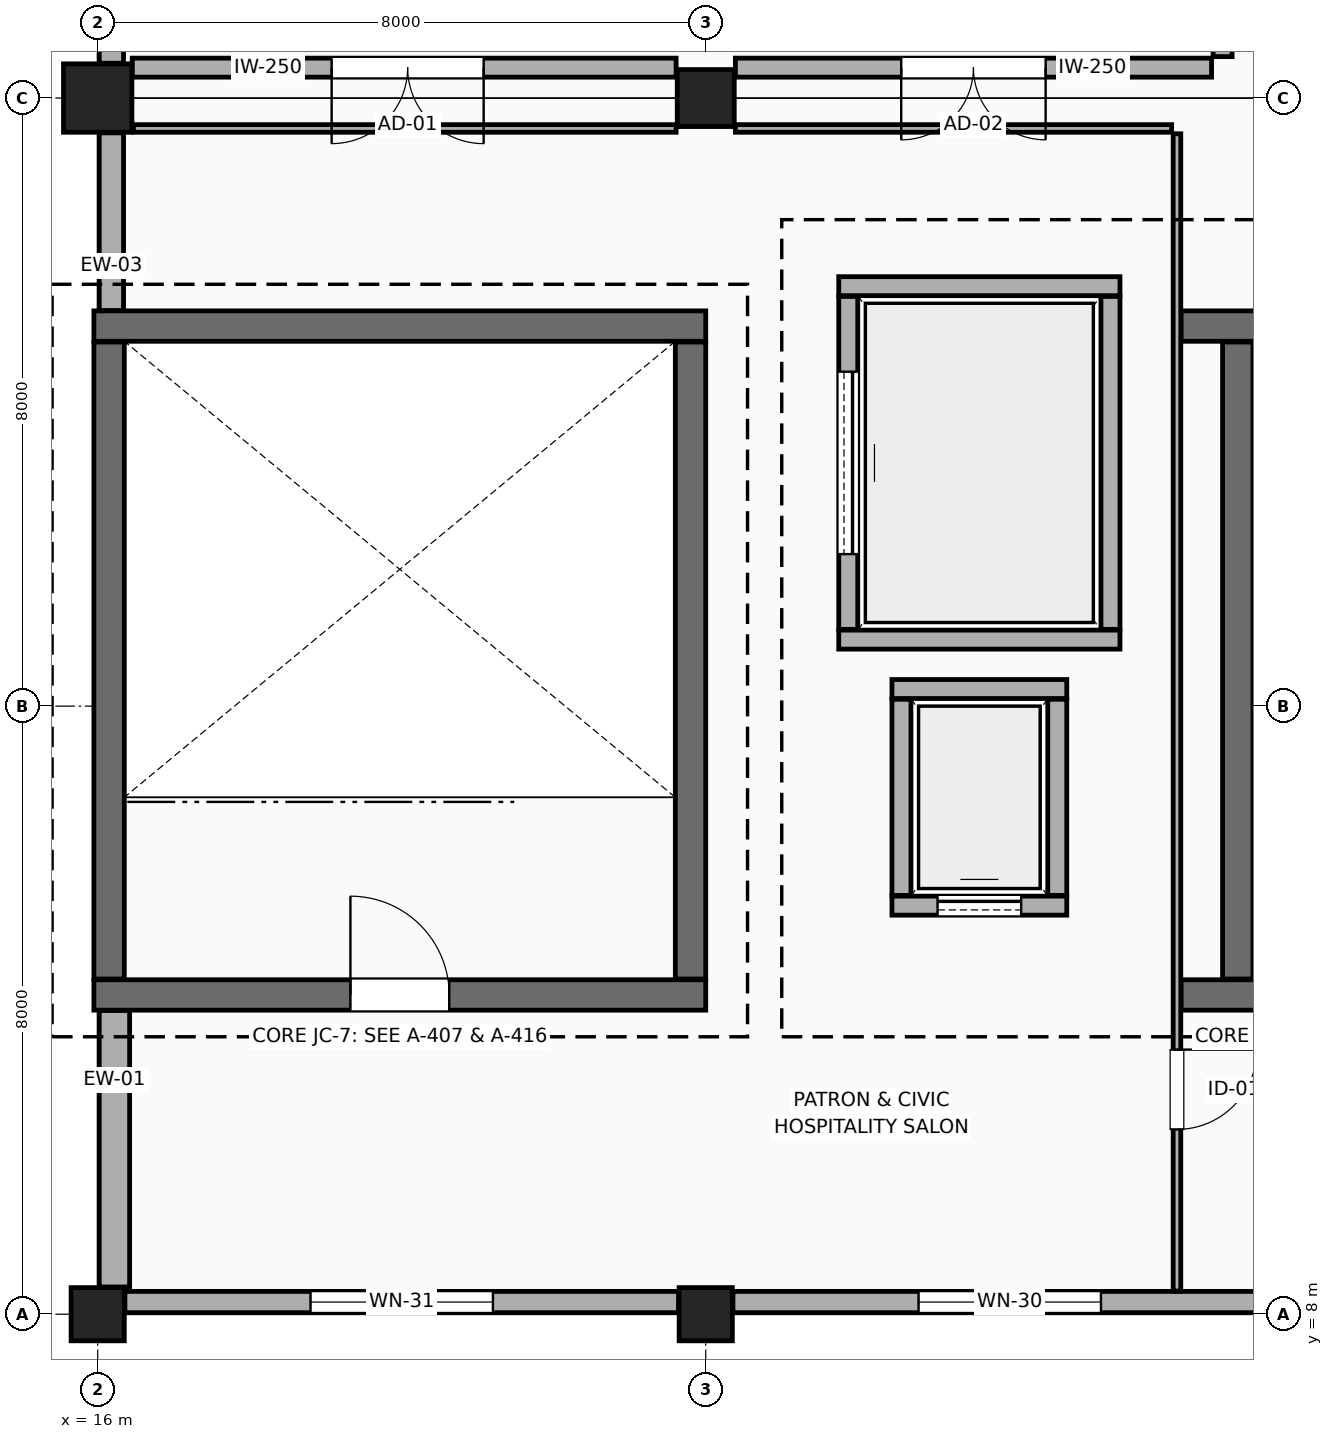
"""IFC4 building model, lengths in metres.
Left out: names, types, materials, properties, quantities, classifications, styles, units other than length and angle.
Written with IfcOpenShell. Run it as: python <this file> out.ifc"""

import sys

from ifc_helpers import new_model, si_unit, direction, frame, frame_2d, origin, origin_2d, place, context, subcontext, project, spatial, rectangle, circle, extrude, element, fill, save


model = new_model("IFC4")
c1 = context("Model", 3, precision=1e-05, world=origin(), true_north=direction((0.0, 1.0)))
c2 = subcontext(c1, "Body", "Model", "MODEL_VIEW")
j1 = project(units=[si_unit("LENGTHUNIT", "METRE"), si_unit("PLANEANGLEUNIT", "RADIAN")], contexts=[c1])
p1 = place(None, origin())
s1 = spatial("IfcSite", under=j1, at=p1, CompositionType="ELEMENT")
p2 = place(p1, origin())
s2 = spatial("IfcBuilding", under=s1, at=p2, CompositionType="ELEMENT")
p3 = place(p2, frame((0.0, 0.0, 10.2)))
s3 = spatial("IfcBuildingStorey", under=s2, at=p3, CompositionType="ELEMENT", Elevation=10.2)
p4 = place(p3, frame((16.0, 8.0, 0.0), z_axis=(0.0, 0.0, 1.0), x_axis=(1.0, 0.0, 0.0)))
e1 = element("IfcColumn", 1, at=p4, inside=s3, PredefinedType="COLUMN", context=c2, shape_type="SweptSolid", body=[
    extrude(circle(Radius=0.35, at=origin_2d()), origin(), (0.0, 0.0, 1.0), 4.76),
])
p5 = place(p3, frame((16.0, 24.0, 0.0), z_axis=(0.0, 0.0, 1.0), x_axis=(1.0, 0.0, 0.0)))
e2 = element("IfcColumn", 2, at=p5, inside=s3, PredefinedType="COLUMN", context=c2, shape_type="SweptSolid", body=[
    extrude(rectangle(XDim=0.9, YDim=0.9, at=origin_2d()), origin(), (0.0, 0.0, 1.0), 4.8),
])
p6 = place(p3, frame((24.0, 8.0, 0.0), z_axis=(0.0, 0.0, 1.0), x_axis=(1.0, 0.0, 0.0)))
e3 = element("IfcColumn", 3, at=p6, inside=s3, PredefinedType="COLUMN", context=c2, shape_type="SweptSolid", body=[
    extrude(circle(Radius=0.35, at=origin_2d()), origin(), (0.0, 0.0, 1.0), 4.76),
])
p7 = place(p3, frame((24.0, 24.0, 0.0), z_axis=(0.0, 0.0, 1.0), x_axis=(1.0, 0.0, 0.0)))
e4 = element("IfcColumn", 4, at=p7, inside=s3, PredefinedType="COLUMN", context=c2, shape_type="SweptSolid", body=[
    extrude(rectangle(XDim=0.75, YDim=0.75, at=origin_2d()), origin(), (0.0, 0.0, 1.0), 4.8),
])
p8 = place(p3, frame((31.642, 8.16, 0.0), z_axis=(0.0, 0.0, 1.0), x_axis=(-1.0, 0.0, 0.0)))
e5 = element("IfcWall", 5, at=p8, inside=s3, PredefinedType="STANDARD", context=c2, shape_type="SweptSolid", body=[
    extrude(rectangle(XDim=7.284, YDim=0.28, at=frame_2d((3.642, 0.0))), origin(), (0.0, 0.0, 1.0), 4.075),
])
p9 = place(p8, frame((2.442, 0.0, 0.95)))
e6 = element("IfcOpeningElement", 6, at=p9, cuts=e5, PredefinedType="OPENING", context=c2, shape_type="SweptSolid", body=[
    extrude(rectangle(XDim=2.4, YDim=1.5, at=frame_2d((1.2, 0.75))), frame((0.0, 0.15, 0.0), z_axis=(0.0, -1.0, 0.0), x_axis=(1.0, 0.0, 0.0)), (0.0, 0.0, 1.0), 0.3),
])
p10 = place(p3, frame((23.642, 8.16, 0.0), z_axis=(0.0, 0.0, 1.0), x_axis=(-1.0, 0.0, 0.0)))
e7 = element("IfcWall", 7, at=p10, inside=s3, PredefinedType="STANDARD", context=c2, shape_type="SweptSolid", body=[
    extrude(rectangle(XDim=7.284, YDim=0.28, at=frame_2d((3.642, 0.0))), origin(), (0.0, 0.0, 1.0), 4.025),
])
p11 = place(p10, frame((2.442, 0.0, 0.95)))
e8 = element("IfcOpeningElement", 8, at=p11, cuts=e7, PredefinedType="OPENING", context=c2, shape_type="SweptSolid", body=[
    extrude(rectangle(XDim=2.4, YDim=1.8, at=frame_2d((1.2, 0.9))), frame((0.0, 0.15, 0.0), z_axis=(0.0, -1.0, 0.0), x_axis=(1.0, 0.0, 0.0)), (0.0, 0.0, 1.0), 0.3),
])
p12 = place(p3, frame((16.22, 8.358, 0.0), z_axis=(0.0, 0.0, 1.0), x_axis=(0.0, 1.0, 0.0)))
e9 = element("IfcWall", 9, at=p12, inside=s3, PredefinedType="STANDARD", context=c2, shape_type="SweptSolid", body=[
    extrude(rectangle(XDim=3.638, YDim=0.4, at=frame_2d((1.819, 0.0))), origin(), (0.0, 0.0, 1.0), 4.225),
])
p13 = place(p3, frame((16.18, 21.204, 0.0), z_axis=(0.0, 0.0, 1.0), x_axis=(0.0, 1.0, 0.0)))
e10 = element("IfcWall", 10, at=p13, inside=s3, PredefinedType="STANDARD", context=c2, shape_type="SweptSolid", body=[
    extrude(rectangle(XDim=2.338, YDim=0.32, at=frame_2d((1.169, 0.0))), origin(), (0.0, 0.0, 1.0), 4.225),
])
p14 = place(p3, frame((16.18, 24.458, 0.0), z_axis=(0.0, 0.0, 1.0), x_axis=(0.0, 1.0, 0.0)))
e11 = element("IfcWall", 11, at=p14, inside=s3, PredefinedType="STANDARD", context=c2, shape_type="SweptSolid", body=[
    extrude(rectangle(XDim=7.084, YDim=0.32, at=frame_2d((3.542, 0.0))), origin(), (0.0, 0.0, 1.0), 3.925),
])
p15 = place(p14, frame((2.342, 0.0, 0.95)))
e12 = element("IfcOpeningElement", 12, at=p15, cuts=e11, PredefinedType="OPENING", context=c2, shape_type="SweptSolid", body=[
    extrude(rectangle(XDim=2.4, YDim=2.1, at=frame_2d((1.2, 1.05))), frame((0.0, 0.17, 0.0), z_axis=(0.0, -1.0, 0.0), x_axis=(1.0, 0.0, 0.0)), (0.0, 0.0, 1.0), 0.34),
])
p16 = place(p3, frame((30.254, 12.2, 0.0), z_axis=(0.0, 0.0, 1.0), x_axis=(1.0, 0.0, 0.0)))
e13 = element("IfcWall", 13, at=p16, inside=s3, PredefinedType="SHEAR", context=c2, shape_type="SweptSolid", body=[
    extrude(rectangle(XDim=8.946, YDim=0.4, at=frame_2d((4.473, 0.0))), origin(), (0.0, 0.0, 1.0), 4.54),
])
p17 = place(p16, frame((4.096, 0.0, 0.0)))
e14 = element("IfcOpeningElement", 14, at=p17, cuts=e13, PredefinedType="OPENING", context=c2, shape_type="SweptSolid", body=[
    extrude(rectangle(XDim=1.3, YDim=2.15, at=frame_2d((0.65, 1.075))), frame((0.0, 0.21, 0.0), z_axis=(0.0, -1.0, 0.0), x_axis=(1.0, 0.0, 0.0)), (0.0, 0.0, 1.0), 0.42),
])
p18 = place(p3, frame((39.2, 21.0, 0.0), z_axis=(0.0, 0.0, 1.0), x_axis=(-1.0, 0.0, 0.0)))
e15 = element("IfcWall", 15, at=p18, inside=s3, PredefinedType="SHEAR", context=c2, shape_type="SweptSolid", body=[
    extrude(rectangle(XDim=8.946, YDim=0.4, at=frame_2d((4.473, 0.0))), origin(), (0.0, 0.0, 1.0), 4.54),
])
p19 = place(p3, frame((31.0, 20.79, 0.0), z_axis=(0.0, 0.0, 1.0), x_axis=(0.0, -1.0, 0.0)))
e16 = element("IfcWall", 16, at=p19, inside=s3, PredefinedType="SHEAR", context=c2, shape_type="SweptSolid", body=[
    extrude(rectangle(XDim=8.38, YDim=0.4, at=frame_2d((4.19, 0.0))), origin(), (0.0, 0.0, 1.0), 4.54),
])
p20 = place(p3, frame((26.45, 13.375, 0.0), z_axis=(0.0, 0.0, 1.0), x_axis=(1.0, 0.0, 0.0)))
e17 = element("IfcWall", 17, at=p20, inside=s3, PredefinedType="STANDARD", context=c2, shape_type="SweptSolid", body=[
    extrude(rectangle(XDim=2.3, YDim=0.25, at=frame_2d((1.15, 0.0))), origin(), (0.0, 0.0, 1.0), 4.53),
])
p21 = place(p20, frame((0.6, 0.0, 0.0)))
e18 = element("IfcOpeningElement", 18, at=p21, cuts=e17, PredefinedType="OPENING", context=c2, shape_type="SweptSolid", body=[
    extrude(rectangle(XDim=1.1, YDim=2.15, at=frame_2d((0.55, 1.075))), frame((0.0, 0.135, 0.0), z_axis=(0.0, -1.0, 0.0), x_axis=(1.0, 0.0, 0.0)), (0.0, 0.0, 1.0), 0.27),
])
p22 = place(p3, frame((28.75, 16.225, 0.0), z_axis=(0.0, 0.0, 1.0), x_axis=(-1.0, 0.0, 0.0)))
e19 = element("IfcWall", 19, at=p22, inside=s3, PredefinedType="STANDARD", context=c2, shape_type="SweptSolid", body=[
    extrude(rectangle(XDim=2.3, YDim=0.25, at=frame_2d((1.15, 0.0))), origin(), (0.0, 0.0, 1.0), 4.53),
])
for number, where, z_axis, x_axis in (
    (20, (28.625, 13.51, 0.0), (0.0, 0.0, 1.0), (0.0, 1.0, 0.0)),
    (21, (26.575, 16.09, 0.0), (0.0, 0.0, 1.0), (0.0, -1.0, 0.0)),
):
    element("IfcWall", number, at=place(p3, frame(where, z_axis=z_axis, x_axis=x_axis)), inside=s3, PredefinedType="STANDARD", context=c2, shape_type="SweptSolid", body=[
        extrude(rectangle(XDim=2.58, YDim=0.25, at=frame_2d((1.29, 0.0))), origin(), (0.0, 0.0, 1.0), 4.53),
    ])
for number, where, z_axis, x_axis in (
    (22, (25.75, 16.875, 0.0), (0.0, 0.0, 1.0), (1.0, 0.0, 0.0)),
    (23, (29.45, 21.525, 0.0), (0.0, 0.0, 1.0), (-1.0, 0.0, 0.0)),
):
    element("IfcWall", number, at=place(p3, frame(where, z_axis=z_axis, x_axis=x_axis)), inside=s3, PredefinedType="STANDARD", context=c2, shape_type="SweptSolid", body=[
        extrude(rectangle(XDim=3.7, YDim=0.25, at=frame_2d((1.85, 0.0))), origin(), (0.0, 0.0, 1.0), 4.53),
    ])
p23 = place(p3, frame((29.325, 17.01, 0.0), z_axis=(0.0, 0.0, 1.0), x_axis=(0.0, 1.0, 0.0)))
e24 = element("IfcWall", 24, at=p23, inside=s3, PredefinedType="STANDARD", context=c2, shape_type="SweptSolid", body=[
    extrude(rectangle(XDim=4.38, YDim=0.25, at=frame_2d((2.19, 0.0))), origin(), (0.0, 0.0, 1.0), 4.53),
])
p24 = place(p3, frame((25.875, 21.39, 0.0), z_axis=(0.0, 0.0, 1.0), x_axis=(0.0, -1.0, 0.0)))
e25 = element("IfcWall", 25, at=p24, inside=s3, PredefinedType="STANDARD", context=c2, shape_type="SweptSolid", body=[
    extrude(rectangle(XDim=4.38, YDim=0.25, at=frame_2d((2.19, 0.0))), origin(), (0.0, 0.0, 1.0), 4.53),
])
p25 = place(p24, frame((0.99, 0.0, 0.0)))
e26 = element("IfcOpeningElement", 26, at=p25, cuts=e25, PredefinedType="OPENING", context=c2, shape_type="SweptSolid", body=[
    extrude(rectangle(XDim=2.4, YDim=2.55, at=frame_2d((1.2, 1.275))), frame((0.0, 0.135, 0.0), z_axis=(0.0, -1.0, 0.0), x_axis=(1.0, 0.0, 0.0)), (0.0, 0.0, 1.0), 0.27),
])
p26 = place(p3, frame((15.95, 12.2, 0.0), z_axis=(0.0, 0.0, 1.0), x_axis=(1.0, 0.0, 0.0)))
e27 = element("IfcWall", 27, at=p26, inside=s3, PredefinedType="SHEAR", context=c2, shape_type="SweptSolid", body=[
    extrude(rectangle(XDim=8.05, YDim=0.4, at=frame_2d((4.025, 0.0))), origin(), (0.0, 0.0, 1.0), 4.58),
])
p27 = place(p26, frame((3.375, 0.0, 0.0)))
e28 = element("IfcOpeningElement", 28, at=p27, cuts=e27, PredefinedType="OPENING", context=c2, shape_type="SweptSolid", body=[
    extrude(rectangle(XDim=1.3, YDim=2.15, at=frame_2d((0.65, 1.075))), frame((0.0, 0.21, 0.0), z_axis=(0.0, -1.0, 0.0), x_axis=(1.0, 0.0, 0.0)), (0.0, 0.0, 1.0), 0.42),
])
p28 = place(p3, frame((24.0, 21.0, 0.0), z_axis=(0.0, 0.0, 1.0), x_axis=(-1.0, 0.0, 0.0)))
e29 = element("IfcWall", 29, at=p28, inside=s3, PredefinedType="SHEAR", context=c2, shape_type="SweptSolid", body=[
    extrude(rectangle(XDim=8.05, YDim=0.4, at=frame_2d((4.025, 0.0))), origin(), (0.0, 0.0, 1.0), 4.58),
])
for number, where, z_axis, x_axis in (
    (30, (23.8, 12.41, 0.0), (0.0, 0.0, 1.0), (0.0, 1.0, 0.0)),
    (31, (16.15, 20.79, 0.0), (0.0, 0.0, 1.0), (0.0, -1.0, 0.0)),
):
    element("IfcWall", number, at=place(p3, frame(where, z_axis=z_axis, x_axis=x_axis)), inside=s3, PredefinedType="SHEAR", context=c2, shape_type="SweptSolid", body=[
        extrude(rectangle(XDim=8.38, YDim=0.4, at=frame_2d((4.19, 0.0))), origin(), (0.0, 0.0, 1.0), 4.58),
    ])
p29 = place(p3, frame((30.8, 49.455, 0.0), z_axis=(0.0, 0.0, 1.0), x_axis=(0.0, -1.0, 0.0)))
e32 = element("IfcWall", 32, at=p29, inside=s3, PredefinedType="PARTITIONING", context=c2, shape_type="SweptSolid", body=[
    extrude(rectangle(XDim=24.91, YDim=0.25, at=frame_2d((12.455, 0.0))), origin(), (0.0, 0.0, 1.0), 4.53),
])
p30 = place(p3, frame((30.655, 24.4, 0.0), z_axis=(0.0, 0.0, 1.0), x_axis=(-1.0, 0.0, 0.0)))
e33 = element("IfcWall", 33, at=p30, inside=s3, PredefinedType="PARTITIONING", context=c2, shape_type="SweptSolid", body=[
    extrude(rectangle(XDim=6.265, YDim=0.25, at=frame_2d((3.133, 0.0))), origin(), (0.0, 0.0, 1.0), 4.53),
])
p31 = place(p30, frame((2.183, 0.0, 0.0)))
e34 = element("IfcOpeningElement", 34, at=p31, cuts=e33, PredefinedType="OPENING", context=c2, shape_type="SweptSolid", body=[
    extrude(rectangle(XDim=1.9, YDim=2.35, at=frame_2d((0.95, 1.175))), frame((0.0, 0.135, 0.0), z_axis=(0.0, -1.0, 0.0), x_axis=(1.0, 0.0, 0.0)), (0.0, 0.0, 1.0), 0.27),
])
p32 = place(p3, frame((23.61, 24.4, 0.0), z_axis=(0.0, 0.0, 1.0), x_axis=(-1.0, 0.0, 0.0)))
e35 = element("IfcWall", 35, at=p32, inside=s3, PredefinedType="PARTITIONING", context=c2, shape_type="SweptSolid", body=[
    extrude(rectangle(XDim=7.156, YDim=0.25, at=frame_2d((3.578, 0.0))), origin(), (0.0, 0.0, 1.0), 4.53),
])
p33 = place(p32, frame((2.532, 0.0, 0.0)))
e36 = element("IfcOpeningElement", 36, at=p33, cuts=e35, PredefinedType="OPENING", context=c2, shape_type="SweptSolid", body=[
    extrude(rectangle(XDim=2.0, YDim=2.35, at=frame_2d((1.0, 1.175))), frame((0.0, 0.135, 0.0), z_axis=(0.0, -1.0, 0.0), x_axis=(1.0, 0.0, 0.0)), (0.0, 0.0, 1.0), 0.27),
])
p34 = place(p3, frame((30.2, 23.53, 0.0), z_axis=(0.0, 0.0, 1.0), x_axis=(0.0, -1.0, 0.0)))
e37 = element("IfcWall", 37, at=p34, inside=s3, PredefinedType="PARTITIONING", context=c2, shape_type="SweptSolid", body=[
    extrude(rectangle(XDim=15.226, YDim=0.1, at=frame_2d((7.613, 0.0))), origin(), (0.0, 0.0, 1.0), 4.53),
])
p35 = place(p34, frame((12.049, 0.0, 0.0)))
e38 = element("IfcOpeningElement", 38, at=p35, cuts=e37, PredefinedType="OPENING", context=c2, shape_type="SweptSolid", body=[
    extrude(rectangle(XDim=1.05, YDim=2.15, at=frame_2d((0.525, 1.075))), frame((0.0, 0.06, 0.0), z_axis=(0.0, -1.0, 0.0), x_axis=(1.0, 0.0, 0.0)), (0.0, 0.0, 1.0), 0.12),
])
p36 = place(p3, frame((16.47, 23.6, 0.0), z_axis=(0.0, 0.0, 1.0), x_axis=(1.0, 0.0, 0.0)))
e39 = element("IfcWall", 39, at=p36, inside=s3, PredefinedType="PARTITIONING", context=c2, shape_type="SweptSolid", body=[
    extrude(rectangle(XDim=7.14, YDim=0.1, at=frame_2d((3.57, 0.0))), origin(), (0.0, 0.0, 1.0), 4.57),
])
p37 = place(p3, frame((24.39, 23.6, 0.0), z_axis=(0.0, 0.0, 1.0), x_axis=(1.0, 0.0, 0.0)))
e40 = element("IfcWall", 40, at=p37, inside=s3, PredefinedType="PARTITIONING", context=c2, shape_type="SweptSolid", body=[
    extrude(rectangle(XDim=5.74, YDim=0.1, at=frame_2d((2.87, 0.0))), origin(), (0.0, 0.0, 1.0), 4.53),
])
p38 = place(p9, origin())
e41 = element("IfcWindow", 41, at=p38, inside=s3, PartitioningType="SINGLE_PANEL", PredefinedType="SKYLIGHT", context=c2, shape_type="SweptSolid", body=[
    extrude(rectangle(XDim=2.4, YDim=1.5, at=frame_2d((1.2, 0.75))), frame((0.0, 0.03, 0.0), z_axis=(0.0, -1.0, 0.0), x_axis=(1.0, 0.0, 0.0)), (0.0, 0.0, 1.0), 0.06),
])
fill(e6, e41)
p39 = place(p11, origin())
e42 = element("IfcWindow", 42, at=p39, inside=s3, PartitioningType="SINGLE_PANEL", PredefinedType="SKYLIGHT", context=c2, shape_type="SweptSolid", body=[
    extrude(rectangle(XDim=2.4, YDim=1.8, at=frame_2d((1.2, 0.9))), frame((0.0, 0.03, 0.0), z_axis=(0.0, -1.0, 0.0), x_axis=(1.0, 0.0, 0.0)), (0.0, 0.0, 1.0), 0.06),
])
fill(e8, e42)
p40 = place(p21, origin())
e43 = element("IfcDoor", 43, at=p40, inside=s3, OperationType="DOUBLE_DOOR_SLIDING", PredefinedType="DOOR", context=c2, shape_type="SweptSolid", body=[
    extrude(rectangle(XDim=1.1, YDim=2.15, at=frame_2d((0.55, 1.075))), frame((0.0, 0.025, 0.0), z_axis=(0.0, -1.0, 0.0), x_axis=(1.0, 0.0, 0.0)), (0.0, 0.0, 1.0), 0.05),
])
fill(e18, e43)
p41 = place(p25, origin())
e44 = element("IfcDoor", 44, at=p41, inside=s3, OperationType="DOUBLE_DOOR_SLIDING", PredefinedType="DOOR", context=c2, shape_type="SweptSolid", body=[
    extrude(rectangle(XDim=2.4, YDim=2.55, at=frame_2d((1.2, 1.275))), frame((0.0, 0.025, 0.0), z_axis=(0.0, -1.0, 0.0), x_axis=(1.0, 0.0, 0.0)), (0.0, 0.0, 1.0), 0.05),
])
fill(e26, e44)
p42 = place(p27, origin())
e45 = element("IfcDoor", 45, at=p42, inside=s3, OperationType="SINGLE_SWING_LEFT", PredefinedType="DOOR", context=c2, shape_type="SweptSolid", body=[
    extrude(rectangle(XDim=1.3, YDim=2.15, at=frame_2d((0.65, 1.075))), frame((0.0, 0.025, 0.0), z_axis=(0.0, -1.0, 0.0), x_axis=(1.0, 0.0, 0.0)), (0.0, 0.0, 1.0), 0.05),
])
fill(e28, e45)
p43 = place(p33, origin())
e46 = element("IfcDoor", 46, at=p43, inside=s3, OperationType="DOUBLE_SWING_LEFT", PredefinedType="DOOR", context=c2, shape_type="SweptSolid", body=[
    extrude(rectangle(XDim=2.0, YDim=2.35, at=frame_2d((1.0, 1.175))), frame((0.0, 0.025, 0.0), z_axis=(0.0, -1.0, 0.0), x_axis=(1.0, 0.0, 0.0)), (0.0, 0.0, 1.0), 0.05),
])
fill(e36, e46)
p44 = place(p31, origin())
e47 = element("IfcDoor", 47, at=p44, inside=s3, OperationType="DOUBLE_SWING_RIGHT", PredefinedType="DOOR", context=c2, shape_type="SweptSolid", body=[
    extrude(rectangle(XDim=1.9, YDim=2.35, at=frame_2d((0.95, 1.175))), frame((0.0, 0.025, 0.0), z_axis=(0.0, -1.0, 0.0), x_axis=(1.0, 0.0, 0.0)), (0.0, 0.0, 1.0), 0.05),
])
fill(e34, e47)
p45 = place(p35, origin())
e48 = element("IfcDoor", 48, at=p45, inside=s3, OperationType="SINGLE_SWING_LEFT", PredefinedType="DOOR", context=c2, shape_type="SweptSolid", body=[
    extrude(rectangle(XDim=1.05, YDim=2.15, at=frame_2d((0.525, 1.075))), frame((0.0, 0.025, 0.0), z_axis=(0.0, -1.0, 0.0), x_axis=(1.0, 0.0, 0.0)), (0.0, 0.0, 1.0), 0.05),
])
fill(e38, e48)
save(model, sys.argv[1])
